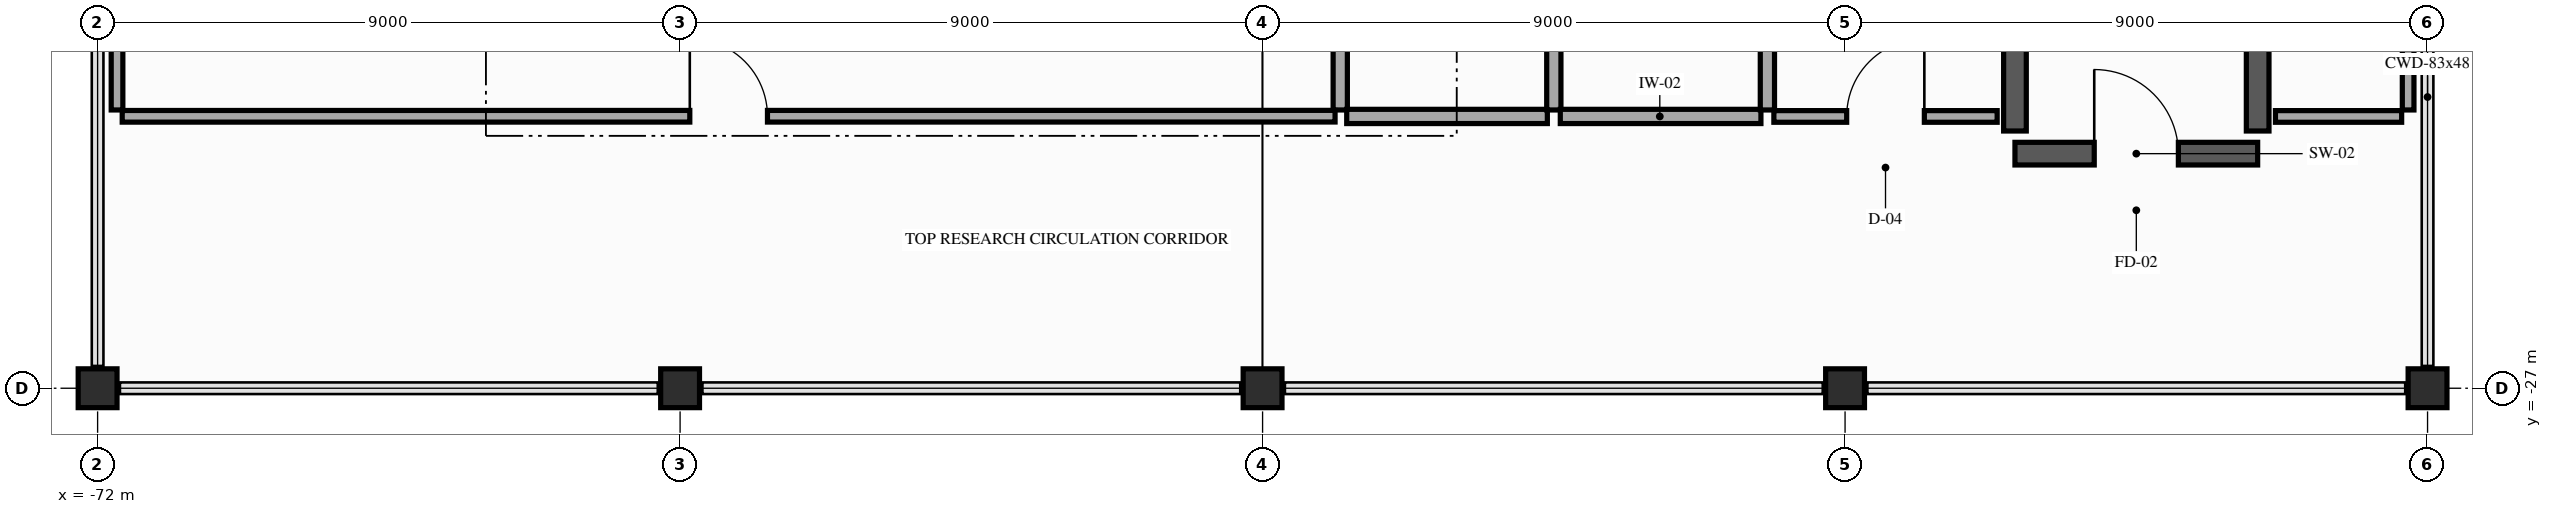
"""IFC4 building model, lengths in metres.
Left out: names, types, materials, properties, quantities, classifications, styles, units other than length and angle.
Written with IfcOpenShell. Run it as: python <this file> out.ifc"""

import sys

from ifc_helpers import new_model, si_unit, direction, frame, frame_2d, origin, origin_2d, place, context, subcontext, project, spatial, rectangle, extrude, element, fill, save


model = new_model("IFC4")
c1 = context("Model", 3, precision=1e-05, world=origin(), true_north=direction((0.0, 1.0)))
c2 = subcontext(c1, "Body", "Model", "MODEL_VIEW")
j1 = project(units=[si_unit("LENGTHUNIT", "METRE"), si_unit("PLANEANGLEUNIT", "RADIAN")], contexts=[c1])
p1 = place(None, origin())
s1 = spatial("IfcSite", under=j1, at=p1, CompositionType="ELEMENT")
p2 = place(p1, origin())
s2 = spatial("IfcBuilding", under=s1, at=p2, CompositionType="ELEMENT")
p3 = place(p2, frame((0.0, 0.0, 27.0)))
s3 = spatial("IfcBuildingStorey", under=s2, at=p3, CompositionType="ELEMENT", Elevation=27.0)
for number, where, z_axis, x_axis in (
    (1, (-72.0, -27.0, 0.0), (0.0, 0.0, 1.0), (1.0, 0.0, 0.0)),
    (2, (-63.0, -27.0, 0.0), (0.0, 0.0, 1.0), (1.0, 0.0, 0.0)),
    (3, (-54.0, -27.0, 0.0), (0.0, 0.0, 1.0), (1.0, 0.0, 0.0)),
    (4, (-45.0, -27.0, 0.0), (0.0, 0.0, 1.0), (1.0, 0.0, 0.0)),
    (5, (-36.0, -27.0, 0.0), (0.0, 0.0, 1.0), (1.0, 0.0, 0.0)),
):
    element("IfcColumn", number, at=place(p3, frame(where, z_axis=z_axis, x_axis=x_axis)), inside=s3, PredefinedType="COLUMN", context=c2, shape_type="SweptSolid", body=[
        extrude(rectangle(XDim=0.6, YDim=0.6, at=origin_2d()), origin(), (0.0, 0.0, 1.0), 5.4),
    ])
p4 = place(p3, frame((-42.375, -23.375, 0.0), z_axis=(0.0, 0.0, 1.0), x_axis=(1.0, 0.0, 0.0)))
e6 = element("IfcWall", 6, at=p4, inside=s3, PredefinedType="SHEAR", context=c2, shape_type="SweptSolid", body=[
    extrude(rectangle(XDim=3.75, YDim=0.35, at=frame_2d((1.875, 0.0))), origin(), (0.0, 0.0, 1.0), 5.15),
])
p5 = place(p4, frame((1.225, 0.0, 0.0)))
e7 = element("IfcOpeningElement", 7, at=p5, cuts=e6, PredefinedType="OPENING", context=c2, shape_type="SweptSolid", body=[
    extrude(rectangle(XDim=1.3, YDim=2.2, at=frame_2d((0.65, 1.1))), frame((0.0, 0.185, 0.0), z_axis=(0.0, -1.0, 0.0), x_axis=(1.0, 0.0, 0.0)), (0.0, 0.0, 1.0), 0.37),
])
for number, where, z_axis, x_axis in (
    (8, (-42.375, -23.025, 0.0), (0.0, 0.0, 1.0), (0.0, 1.0, 0.0)),
    (9, (-38.625, -23.025, 0.0), (0.0, 0.0, 1.0), (0.0, 1.0, 0.0)),
):
    element("IfcWall", number, at=place(p3, frame(where, z_axis=z_axis, x_axis=x_axis)), inside=s3, PredefinedType="SHEAR", context=c2, shape_type="SweptSolid", body=[
        extrude(rectangle(XDim=9.1, YDim=0.35, at=frame_2d((4.55, 0.0))), origin(), (0.0, 0.0, 1.0), 5.15),
    ])
p6 = place(p3, frame((-52.8, -19.1, 0.0), z_axis=(0.0, 0.0, 1.0), x_axis=(0.0, -1.0, 0.0)))
e10 = element("IfcWall", 10, at=p6, inside=s3, PredefinedType="PLUMBINGWALL", context=c2, shape_type="SweptSolid", body=[
    extrude(rectangle(XDim=3.6, YDim=0.22, at=frame_2d((1.8, 0.0))), origin(), (0.0, 0.0, 1.0), 5.05),
])
p7 = place(p6, frame((1.275, 0.0, 0.0)))
e11 = element("IfcOpeningElement", 11, at=p7, cuts=e10, PredefinedType="OPENING", context=c2, shape_type="SweptSolid", body=[
    extrude(rectangle(XDim=1.05, YDim=2.15, at=frame_2d((0.525, 1.075))), frame((0.0, 0.12, 0.0), z_axis=(0.0, -1.0, 0.0), x_axis=(1.0, 0.0, 0.0)), (0.0, 0.0, 1.0), 0.24),
])
p8 = place(p3, frame((-52.7, -22.8, 0.0), z_axis=(0.0, 0.0, 1.0), x_axis=(1.0, 0.0, 0.0)))
e12 = element("IfcWall", 12, at=p8, inside=s3, PredefinedType="PLUMBINGWALL", context=c2, shape_type="SweptSolid", body=[
    extrude(rectangle(XDim=3.1, YDim=0.22, at=frame_2d((1.55, 0.0))), origin(), (0.0, 0.0, 1.0), 5.05),
])
p9 = place(p3, frame((-49.5, -22.7, 0.0), z_axis=(0.0, 0.0, 1.0), x_axis=(0.0, 1.0, 0.0)))
e13 = element("IfcWall", 13, at=p9, inside=s3, PredefinedType="PLUMBINGWALL", context=c2, shape_type="SweptSolid", body=[
    extrude(rectangle(XDim=3.6, YDim=0.22, at=frame_2d((1.8, 0.0))), origin(), (0.0, 0.0, 1.0), 5.05),
])
p10 = place(p3, frame((-49.4, -22.8, 0.0), z_axis=(0.0, 0.0, 1.0), x_axis=(1.0, 0.0, 0.0)))
e14 = element("IfcWall", 14, at=p10, inside=s3, PredefinedType="PLUMBINGWALL", context=c2, shape_type="SweptSolid", body=[
    extrude(rectangle(XDim=3.1, YDim=0.22, at=frame_2d((1.55, 0.0))), origin(), (0.0, 0.0, 1.0), 5.05),
])
p11 = place(p3, frame((-46.2, -22.7, 0.0), z_axis=(0.0, 0.0, 1.0), x_axis=(0.0, 1.0, 0.0)))
e15 = element("IfcWall", 15, at=p11, inside=s3, PredefinedType="PLUMBINGWALL", context=c2, shape_type="SweptSolid", body=[
    extrude(rectangle(XDim=3.6, YDim=0.22, at=frame_2d((1.8, 0.0))), origin(), (0.0, 0.0, 1.0), 5.05),
])
p12 = place(p11, frame((1.325, 0.0, 0.0)))
e16 = element("IfcOpeningElement", 16, at=p12, cuts=e15, PredefinedType="OPENING", context=c2, shape_type="SweptSolid", body=[
    extrude(rectangle(XDim=0.95, YDim=2.15, at=frame_2d((0.475, 1.075))), frame((0.0, 0.12, 0.0), z_axis=(0.0, -1.0, 0.0), x_axis=(1.0, 0.0, 0.0)), (0.0, 0.0, 1.0), 0.24),
])
p13 = place(p3, frame((-71.7, -18.65, 0.0), z_axis=(0.0, 0.0, 1.0), x_axis=(0.0, -1.0, 0.0)))
e17 = element("IfcWall", 17, at=p13, inside=s3, PredefinedType="PARTITIONING", context=c2, shape_type="SweptSolid", body=[
    extrude(rectangle(XDim=4.05, YDim=0.18, at=frame_2d((2.025, 0.0))), origin(), (0.0, 0.0, 1.0), 4.785),
])
p14 = place(p3, frame((-71.62, -22.798, 0.0), z_axis=(0.0, 0.0, 1.0), x_axis=(0.999999993126, 0.000117248566, 0.0)))
e18 = element("IfcWall", 18, at=p14, inside=s3, PredefinedType="PARTITIONING", context=c2, shape_type="SweptSolid", body=[
    extrude(rectangle(XDim=18.74, YDim=0.18, at=frame_2d((9.37, 0.0))), origin(), (0.0, 0.0, 1.0), 4.785),
])
p15 = place(p14, frame((8.77, 0.0, 0.0)))
e19 = element("IfcOpeningElement", 19, at=p15, cuts=e18, PredefinedType="OPENING", context=c2, shape_type="SweptSolid", body=[
    extrude(rectangle(XDim=1.2, YDim=2.2, at=frame_2d((0.6, 1.1))), frame((0.0, 0.1, 0.0), z_axis=(0.0, -1.0, 0.0), x_axis=(1.0, 0.0, 0.0)), (0.0, 0.0, 1.0), 0.2),
])
p16 = place(p3, frame((-46.1, -22.8, 0.0), z_axis=(0.0, 0.0, 1.0), x_axis=(1.0, 0.0, 0.0)))
e20 = element("IfcWall", 20, at=p16, inside=s3, PredefinedType="PARTITIONING", context=c2, shape_type="SweptSolid", body=[
    extrude(rectangle(XDim=3.45, YDim=0.18, at=frame_2d((1.725, 0.0))), origin(), (0.0, 0.0, 1.0), 4.785),
])
p17 = place(p16, frame((1.125, 0.0, 0.0)))
e21 = element("IfcOpeningElement", 21, at=p17, cuts=e20, PredefinedType="OPENING", context=c2, shape_type="SweptSolid", body=[
    extrude(rectangle(XDim=1.2, YDim=2.2, at=frame_2d((0.6, 1.1))), frame((0.0, 0.1, 0.0), z_axis=(0.0, -1.0, 0.0), x_axis=(1.0, 0.0, 0.0)), (0.0, 0.0, 1.0), 0.2),
])
p18 = place(p3, frame((-38.35, -22.8, 0.0), z_axis=(0.0, 0.0, 1.0), x_axis=(1.0, 0.0, 0.0)))
e22 = element("IfcWall", 22, at=p18, inside=s3, PredefinedType="PARTITIONING", context=c2, shape_type="SweptSolid", body=[
    extrude(rectangle(XDim=1.95, YDim=0.18, at=frame_2d((0.975, 0.0))), origin(), (0.0, 0.0, 1.0), 4.785),
])
p19 = place(p3, frame((-36.3, -22.7, 0.0), z_axis=(0.0, 0.0, 1.0), x_axis=(0.0, 1.0, 0.0)))
e23 = element("IfcWall", 23, at=p19, inside=s3, PredefinedType="PARTITIONING", context=c2, shape_type="SweptSolid", body=[
    extrude(rectangle(XDim=4.05, YDim=0.18, at=frame_2d((2.025, 0.0))), origin(), (0.0, 0.0, 1.0), 4.785),
])
p20 = place(p5, origin())
e24 = element("IfcDoor", 24, at=p20, inside=s3, OperationType="SINGLE_SWING_LEFT", PredefinedType="DOOR", context=c2, shape_type="SweptSolid", body=[
    extrude(rectangle(XDim=1.3, YDim=2.2, at=frame_2d((0.65, 1.1))), frame((0.0, 0.025, 0.0), z_axis=(0.0, -1.0, 0.0), x_axis=(1.0, 0.0, 0.0)), (0.0, 0.0, 1.0), 0.05),
])
fill(e7, e24)
p21 = place(p15, origin())
e25 = element("IfcDoor", 25, at=p21, inside=s3, OperationType="SINGLE_SWING_LEFT", PredefinedType="DOOR", context=c2, shape_type="SweptSolid", body=[
    extrude(rectangle(XDim=1.2, YDim=2.2, at=frame_2d((0.6, 1.1))), frame((0.0, 0.025, 0.0), z_axis=(0.0, -1.0, 0.0), x_axis=(1.0, 0.0, 0.0)), (0.0, 0.0, 1.0), 0.05),
])
fill(e19, e25)
p22 = place(p17, origin())
e26 = element("IfcDoor", 26, at=p22, inside=s3, OperationType="SINGLE_SWING_RIGHT", PredefinedType="DOOR", context=c2, shape_type="SweptSolid", body=[
    extrude(rectangle(XDim=1.2, YDim=2.2, at=frame_2d((0.6, 1.1))), frame((0.0, 0.025, 0.0), z_axis=(0.0, -1.0, 0.0), x_axis=(1.0, 0.0, 0.0)), (0.0, 0.0, 1.0), 0.05),
])
fill(e21, e26)
save(model, sys.argv[1])
